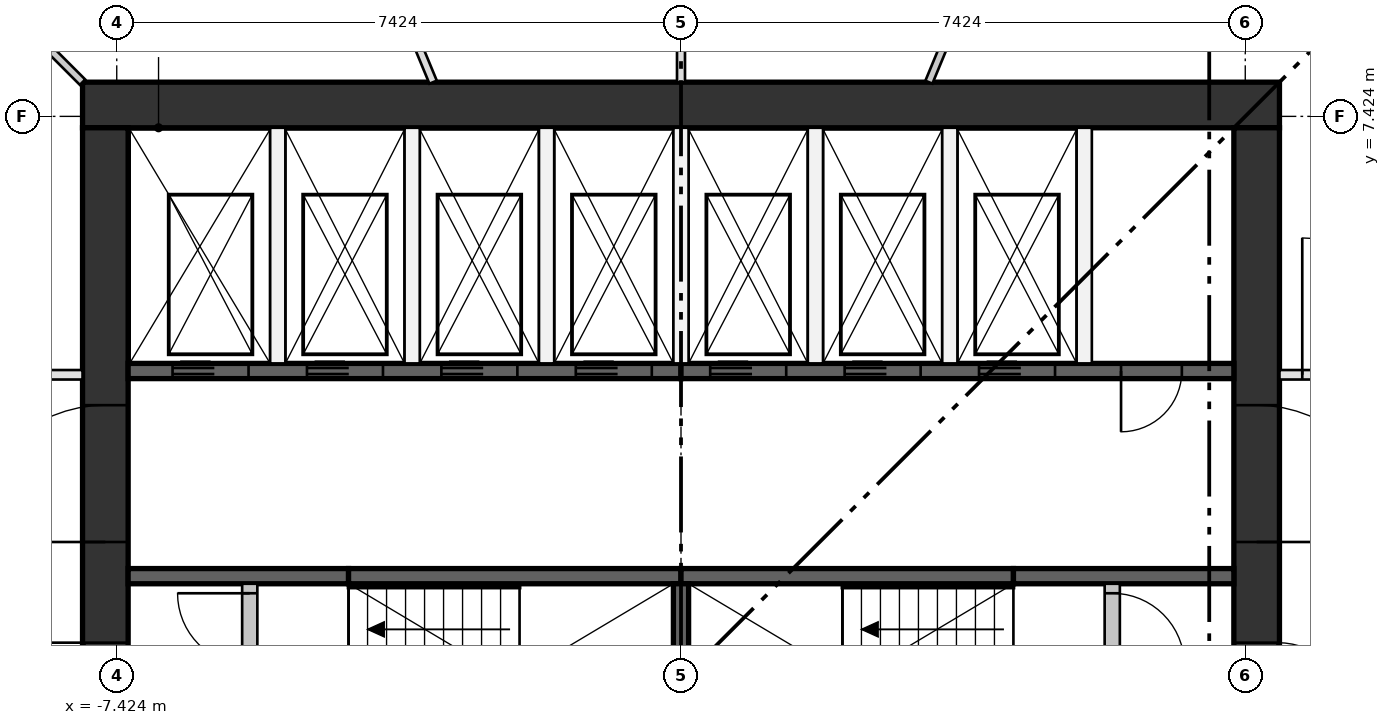
"""IFC4 building model, lengths in metres.
Left out: names, types, materials, properties, quantities, classifications, styles, units other than length and angle.
Written with IfcOpenShell. Run it as: python <this file> out.ifc"""

import sys

from ifc_helpers import new_model, si_unit, direction, frame, frame_2d, origin, place, context, subcontext, project, spatial, rectangle, extrude, element, fill, save


model = new_model("IFC4")
c1 = context("Model", 3, precision=1e-05, world=origin(), true_north=direction((0.0, 1.0)))
c2 = subcontext(c1, "Body", "Model", "MODEL_VIEW")
j1 = project(units=[si_unit("LENGTHUNIT", "METRE"), si_unit("PLANEANGLEUNIT", "RADIAN")], contexts=[c1])
p1 = place(None, origin())
s1 = spatial("IfcSite", under=j1, at=p1, CompositionType="ELEMENT")
p2 = place(p1, origin())
s2 = spatial("IfcBuilding", under=s1, at=p2, CompositionType="ELEMENT")
p3 = place(p2, frame((0.0, 0.0, 147.75)))
s3 = spatial("IfcBuildingStorey", under=s2, at=p3, CompositionType="ELEMENT", Elevation=147.75)
p4 = place(p3, frame((-7.874, 7.574, 0.0), z_axis=(0.0, 0.0, 1.0), x_axis=(1.0, 0.0, 0.0)))
e1 = element("IfcWall", 1, at=p4, inside=s3, PredefinedType="SHEAR", context=c2, shape_type="SweptSolid", body=[
    extrude(rectangle(XDim=15.748, YDim=0.6, at=frame_2d((7.874, 0.0))), origin(), (0.0, 0.0, 1.0), 3.35),
])
p5 = place(p3, frame((-7.574, -7.274, 0.0), z_axis=(0.0, 0.0, 1.0), x_axis=(0.0, 1.0, 0.0)))
e2 = element("IfcWall", 2, at=p5, inside=s3, PredefinedType="SHEAR", context=c2, shape_type="SweptSolid", body=[
    extrude(rectangle(XDim=14.548, YDim=0.6, at=frame_2d((7.274, 0.0))), origin(), (0.0, 0.0, 1.0), 3.35),
])
p6 = place(p5, frame((6.774, 0.0, 0.0)))
e3 = element("IfcOpeningElement", 3, at=p6, cuts=e2, PredefinedType="OPENING", context=c2, shape_type="SweptSolid", body=[
    extrude(rectangle(XDim=1.0, YDim=2.1, at=frame_2d((0.5, 1.05))), frame((0.0, 0.31, 0.0), z_axis=(0.0, -1.0, 0.0), x_axis=(1.0, 0.0, 0.0)), (0.0, 0.0, 1.0), 0.62),
])
p7 = place(p5, frame((3.649, 0.0, 0.0)))
e4 = element("IfcOpeningElement", 4, at=p7, cuts=e2, PredefinedType="OPENING", context=c2, shape_type="SweptSolid", body=[
    extrude(rectangle(XDim=1.8, YDim=2.1, at=frame_2d((0.9, 1.05))), frame((0.0, 0.31, 0.0), z_axis=(0.0, -1.0, 0.0), x_axis=(1.0, 0.0, 0.0)), (0.0, 0.0, 1.0), 0.62),
])
p8 = place(p5, frame((9.098, 0.0, 0.0)))
e5 = element("IfcOpeningElement", 5, at=p8, cuts=e2, PredefinedType="OPENING", context=c2, shape_type="SweptSolid", body=[
    extrude(rectangle(XDim=1.8, YDim=2.1, at=frame_2d((0.9, 1.05))), frame((0.0, 0.31, 0.0), z_axis=(0.0, -1.0, 0.0), x_axis=(1.0, 0.0, 0.0)), (0.0, 0.0, 1.0), 0.62),
])
p9 = place(p3, frame((7.574, -7.274, 0.0), z_axis=(0.0, 0.0, 1.0), x_axis=(0.0, 1.0, 0.0)))
e6 = element("IfcWall", 6, at=p9, inside=s3, PredefinedType="SHEAR", context=c2, shape_type="SweptSolid", body=[
    extrude(rectangle(XDim=14.548, YDim=0.6, at=frame_2d((7.274, 0.0))), origin(), (0.0, 0.0, 1.0), 3.35),
])
p10 = place(p9, frame((6.774, 0.0, 0.0)))
e7 = element("IfcOpeningElement", 7, at=p10, cuts=e6, PredefinedType="OPENING", context=c2, shape_type="SweptSolid", body=[
    extrude(rectangle(XDim=1.0, YDim=2.1, at=frame_2d((0.5, 1.05))), frame((0.0, 0.31, 0.0), z_axis=(0.0, -1.0, 0.0), x_axis=(1.0, 0.0, 0.0)), (0.0, 0.0, 1.0), 0.62),
])
p11 = place(p9, frame((3.649, 0.0, 0.0)))
e8 = element("IfcOpeningElement", 8, at=p11, cuts=e6, PredefinedType="OPENING", context=c2, shape_type="SweptSolid", body=[
    extrude(rectangle(XDim=1.8, YDim=2.1, at=frame_2d((0.9, 1.05))), frame((0.0, 0.31, 0.0), z_axis=(0.0, -1.0, 0.0), x_axis=(1.0, 0.0, 0.0)), (0.0, 0.0, 1.0), 0.62),
])
p12 = place(p9, frame((9.098, 0.0, 0.0)))
e9 = element("IfcOpeningElement", 9, at=p12, cuts=e6, PredefinedType="OPENING", context=c2, shape_type="SweptSolid", body=[
    extrude(rectangle(XDim=1.8, YDim=2.1, at=frame_2d((0.9, 1.05))), frame((0.0, 0.31, 0.0), z_axis=(0.0, -1.0, 0.0), x_axis=(1.0, 0.0, 0.0)), (0.0, 0.0, 1.0), 0.62),
])
p13 = place(p3, frame((-7.274, 4.074, 0.0), z_axis=(0.0, 0.0, 1.0), x_axis=(1.0, 0.0, 0.0)))
e10 = element("IfcWall", 10, at=p13, inside=s3, PredefinedType="SHEAR", context=c2, shape_type="SweptSolid", body=[
    extrude(rectangle(XDim=7.274, YDim=0.2, at=frame_2d((3.637, 0.0))), origin(), (0.0, 0.0, 1.0), 3.0),
])
p14 = place(p13, frame((0.584, 0.0, 0.0)))
e11 = element("IfcOpeningElement", 11, at=p14, cuts=e10, PredefinedType="OPENING", context=c2, shape_type="SweptSolid", body=[
    extrude(rectangle(XDim=1.0, YDim=2.1, at=frame_2d((0.5, 1.05))), frame((0.0, 0.11, 0.0), z_axis=(0.0, -1.0, 0.0), x_axis=(1.0, 0.0, 0.0)), (0.0, 0.0, 1.0), 0.22),
])
p15 = place(p13, frame((2.353, 0.0, 0.0)))
e12 = element("IfcOpeningElement", 12, at=p15, cuts=e10, PredefinedType="OPENING", context=c2, shape_type="SweptSolid", body=[
    extrude(rectangle(XDim=1.0, YDim=2.1, at=frame_2d((0.5, 1.05))), frame((0.0, 0.11, 0.0), z_axis=(0.0, -1.0, 0.0), x_axis=(1.0, 0.0, 0.0)), (0.0, 0.0, 1.0), 0.22),
])
p16 = place(p13, frame((4.121, 0.0, 0.0)))
e13 = element("IfcOpeningElement", 13, at=p16, cuts=e10, PredefinedType="OPENING", context=c2, shape_type="SweptSolid", body=[
    extrude(rectangle(XDim=1.0, YDim=2.1, at=frame_2d((0.5, 1.05))), frame((0.0, 0.11, 0.0), z_axis=(0.0, -1.0, 0.0), x_axis=(1.0, 0.0, 0.0)), (0.0, 0.0, 1.0), 0.22),
])
p17 = place(p13, frame((5.89, 0.0, 0.0)))
e14 = element("IfcOpeningElement", 14, at=p17, cuts=e10, PredefinedType="OPENING", context=c2, shape_type="SweptSolid", body=[
    extrude(rectangle(XDim=1.0, YDim=2.1, at=frame_2d((0.5, 1.05))), frame((0.0, 0.11, 0.0), z_axis=(0.0, -1.0, 0.0), x_axis=(1.0, 0.0, 0.0)), (0.0, 0.0, 1.0), 0.22),
])
p18 = place(p3, frame((0.0, 4.074, 0.0), z_axis=(0.0, 0.0, 1.0), x_axis=(1.0, 0.0, 0.0)))
e15 = element("IfcWall", 15, at=p18, inside=s3, PredefinedType="SHEAR", context=c2, shape_type="SweptSolid", body=[
    extrude(rectangle(XDim=7.274, YDim=0.2, at=frame_2d((3.637, 0.0))), origin(), (0.0, 0.0, 1.0), 3.0),
])
p19 = place(p18, frame((0.384, 0.0, 0.0)))
e16 = element("IfcOpeningElement", 16, at=p19, cuts=e15, PredefinedType="OPENING", context=c2, shape_type="SweptSolid", body=[
    extrude(rectangle(XDim=1.0, YDim=2.1, at=frame_2d((0.5, 1.05))), frame((0.0, 0.11, 0.0), z_axis=(0.0, -1.0, 0.0), x_axis=(1.0, 0.0, 0.0)), (0.0, 0.0, 1.0), 0.22),
])
p20 = place(p18, frame((2.153, 0.0, 0.0)))
e17 = element("IfcOpeningElement", 17, at=p20, cuts=e15, PredefinedType="OPENING", context=c2, shape_type="SweptSolid", body=[
    extrude(rectangle(XDim=1.0, YDim=2.1, at=frame_2d((0.5, 1.05))), frame((0.0, 0.11, 0.0), z_axis=(0.0, -1.0, 0.0), x_axis=(1.0, 0.0, 0.0)), (0.0, 0.0, 1.0), 0.22),
])
p21 = place(p18, frame((3.921, 0.0, 0.0)))
e18 = element("IfcOpeningElement", 18, at=p21, cuts=e15, PredefinedType="OPENING", context=c2, shape_type="SweptSolid", body=[
    extrude(rectangle(XDim=1.0, YDim=2.1, at=frame_2d((0.5, 1.05))), frame((0.0, 0.11, 0.0), z_axis=(0.0, -1.0, 0.0), x_axis=(1.0, 0.0, 0.0)), (0.0, 0.0, 1.0), 0.22),
])
p22 = place(p18, frame((5.79, 0.0, 0.0)))
e19 = element("IfcOpeningElement", 19, at=p22, cuts=e15, PredefinedType="OPENING", context=c2, shape_type="SweptSolid", body=[
    extrude(rectangle(XDim=0.8, YDim=2.1, at=frame_2d((0.4, 1.05))), frame((0.0, 0.11, 0.0), z_axis=(0.0, -1.0, 0.0), x_axis=(1.0, 0.0, 0.0)), (0.0, 0.0, 1.0), 0.22),
])
p23 = place(p3, frame((-7.274, 1.375, 0.0), z_axis=(0.0, 0.0, 1.0), x_axis=(1.0, 0.0, 0.0)))
e20 = element("IfcWall", 20, at=p23, inside=s3, PredefinedType="SHEAR", context=c2, shape_type="SweptSolid", body=[
    extrude(rectangle(XDim=2.9, YDim=0.2, at=frame_2d((1.45, 0.0))), origin(), (0.0, 0.0, 1.0), 3.0),
])
for number, where, z_axis, x_axis in (
    (21, (-4.374, 1.375, 0.0), (0.0, 0.0, 1.0), (1.0, 0.0, 0.0)),
    (22, (0.0, 1.375, 0.0), (0.0, 0.0, 1.0), (1.0, 0.0, 0.0)),
):
    element("IfcWall", number, at=place(p3, frame(where, z_axis=z_axis, x_axis=x_axis)), inside=s3, PredefinedType="SHEAR", context=c2, shape_type="SweptSolid", body=[
        extrude(rectangle(XDim=4.374, YDim=0.2, at=frame_2d((2.187, 0.0))), origin(), (0.0, 0.0, 1.0), 3.0),
    ])
p24 = place(p3, frame((4.374, 1.375, 0.0), z_axis=(0.0, 0.0, 1.0), x_axis=(1.0, 0.0, 0.0)))
e23 = element("IfcWall", 23, at=p24, inside=s3, PredefinedType="SHEAR", context=c2, shape_type="SweptSolid", body=[
    extrude(rectangle(XDim=2.9, YDim=0.2, at=frame_2d((1.45, 0.0))), origin(), (0.0, 0.0, 1.0), 3.0),
])
p25 = place(p3, frame((0.0, -1.275, 0.0), z_axis=(0.0, 0.0, 1.0), x_axis=(0.0, 1.0, 0.0)))
e24 = element("IfcWall", 24, at=p25, inside=s3, PredefinedType="SHEAR", context=c2, shape_type="SweptSolid", body=[
    extrude(rectangle(XDim=2.55, YDim=0.2, at=frame_2d((1.275, 0.0))), origin(), (0.0, 0.0, 1.0), 3.0),
])
for number, where, z_axis, x_axis in (
    (25, (-5.305, 4.174, 0.0), (0.0, 0.0, 1.0), (0.0, 1.0, 0.0)),
    (26, (-3.537, 4.174, 0.0), (0.0, 0.0, 1.0), (0.0, 1.0, 0.0)),
    (27, (-1.769, 4.174, 0.0), (0.0, 0.0, 1.0), (0.0, 1.0, 0.0)),
    (28, (0.0, 4.174, 0.0), (0.0, 0.0, 1.0), (0.0, 1.0, 0.0)),
    (29, (1.769, 4.174, 0.0), (0.0, 0.0, 1.0), (0.0, 1.0, 0.0)),
    (30, (3.537, 4.174, 0.0), (0.0, 0.0, 1.0), (0.0, 1.0, 0.0)),
    (31, (5.305, 4.174, 0.0), (0.0, 0.0, 1.0), (0.0, 1.0, 0.0)),
):
    element("IfcWall", number, at=place(p3, frame(where, z_axis=z_axis, x_axis=x_axis)), inside=s3, PredefinedType="PARTITIONING", context=c2, shape_type="SweptSolid", body=[
        extrude(rectangle(XDim=3.1, YDim=0.2, at=frame_2d((1.55, 0.0))), origin(), (0.0, 0.0, 1.0), 3.0),
    ])
p26 = place(p3, frame((-5.674, -1.275, 0.0), z_axis=(0.0, 0.0, 1.0), x_axis=(0.0, 1.0, 0.0)))
e32 = element("IfcWall", 32, at=p26, inside=s3, PredefinedType="PARTITIONING", context=c2, shape_type="SweptSolid", body=[
    extrude(rectangle(XDim=2.55, YDim=0.2, at=frame_2d((1.275, 0.0))), origin(), (0.0, 0.0, 1.0), 3.0),
])
p27 = place(p26, frame((0.125, 0.0, 0.0)))
e33 = element("IfcOpeningElement", 33, at=p27, cuts=e32, PredefinedType="OPENING", context=c2, shape_type="SweptSolid", body=[
    extrude(rectangle(XDim=0.95, YDim=2.1, at=frame_2d((0.475, 1.05))), frame((0.0, 0.11, 0.0), z_axis=(0.0, -1.0, 0.0), x_axis=(1.0, 0.0, 0.0)), (0.0, 0.0, 1.0), 0.22),
])
p28 = place(p26, frame((1.475, 0.0, 0.0)))
e34 = element("IfcOpeningElement", 34, at=p28, cuts=e32, PredefinedType="OPENING", context=c2, shape_type="SweptSolid", body=[
    extrude(rectangle(XDim=0.95, YDim=2.1, at=frame_2d((0.475, 1.05))), frame((0.0, 0.11, 0.0), z_axis=(0.0, -1.0, 0.0), x_axis=(1.0, 0.0, 0.0)), (0.0, 0.0, 1.0), 0.22),
])
p29 = place(p3, frame((5.674, -1.275, 0.0), z_axis=(0.0, 0.0, 1.0), x_axis=(0.0, 1.0, 0.0)))
e35 = element("IfcWall", 35, at=p29, inside=s3, PredefinedType="PARTITIONING", context=c2, shape_type="SweptSolid", body=[
    extrude(rectangle(XDim=2.55, YDim=0.2, at=frame_2d((1.275, 0.0))), origin(), (0.0, 0.0, 1.0), 3.0),
])
p30 = place(p29, frame((0.125, 0.0, 0.0)))
e36 = element("IfcOpeningElement", 36, at=p30, cuts=e35, PredefinedType="OPENING", context=c2, shape_type="SweptSolid", body=[
    extrude(rectangle(XDim=0.95, YDim=2.1, at=frame_2d((0.475, 1.05))), frame((0.0, 0.11, 0.0), z_axis=(0.0, -1.0, 0.0), x_axis=(1.0, 0.0, 0.0)), (0.0, 0.0, 1.0), 0.22),
])
p31 = place(p29, frame((1.475, 0.0, 0.0)))
e37 = element("IfcOpeningElement", 37, at=p31, cuts=e35, PredefinedType="OPENING", context=c2, shape_type="SweptSolid", body=[
    extrude(rectangle(XDim=0.95, YDim=2.1, at=frame_2d((0.475, 1.05))), frame((0.0, 0.11, 0.0), z_axis=(0.0, -1.0, 0.0), x_axis=(1.0, 0.0, 0.0)), (0.0, 0.0, 1.0), 0.22),
])
p32 = place(p3, frame((7.874, 4.024, 0.0), z_axis=(0.0, 0.0, 1.0), x_axis=(1.0, 0.0, 0.0)))
e38 = element("IfcWall", 38, at=p32, inside=s3, PredefinedType="PARTITIONING", context=c2, shape_type="SweptSolid", body=[
    extrude(rectangle(XDim=3.529, YDim=0.125, at=frame_2d((1.764, 0.0))), origin(), (0.0, 0.0, 1.0), 3.0),
])
p33 = place(p32, frame((0.3, 0.0, 0.0)))
e39 = element("IfcOpeningElement", 39, at=p33, cuts=e38, PredefinedType="OPENING", context=c2, shape_type="SweptSolid", body=[
    extrude(rectangle(XDim=1.8, YDim=2.1, at=frame_2d((0.9, 1.05))), frame((0.0, 0.073, 0.0), z_axis=(0.0, -1.0, 0.0), x_axis=(1.0, 0.0, 0.0)), (0.0, 0.0, 1.0), 0.145),
])
p34 = place(p3, frame((-11.508, 4.024, 0.0), z_axis=(0.0, 0.0, 1.0), x_axis=(1.0, 0.0, 0.0)))
e40 = element("IfcWall", 40, at=p34, inside=s3, PredefinedType="PARTITIONING", context=c2, shape_type="SweptSolid", body=[
    extrude(rectangle(XDim=3.634, YDim=0.125, at=frame_2d((1.817, 0.0))), origin(), (0.0, 0.0, 1.0), 3.0),
])
p35 = place(p34, frame((1.3, 0.0, 0.0)))
e41 = element("IfcOpeningElement", 41, at=p35, cuts=e40, PredefinedType="OPENING", context=c2, shape_type="SweptSolid", body=[
    extrude(rectangle(XDim=1.0, YDim=2.1, at=frame_2d((0.5, 1.05))), frame((0.0, 0.073, 0.0), z_axis=(0.0, -1.0, 0.0), x_axis=(1.0, 0.0, 0.0)), (0.0, 0.0, 1.0), 0.145),
])
p36 = place(p3, frame((3.261, 7.874, 0.0), z_axis=(0.0, 0.0, 1.0), x_axis=(0.382694772383, 0.92387483524, 0.0)))
e42 = element("IfcWall", 42, at=p36, inside=s3, PredefinedType="PARTITIONING", context=c2, shape_type="SweptSolid", body=[
    extrude(rectangle(XDim=6.077, YDim=0.1, at=frame_2d((3.039, 0.0))), origin(), (0.0, 0.0, 1.0), 3.0),
])
p37 = place(p36, frame((2.5, 0.0, 0.0)))
e43 = element("IfcOpeningElement", 43, at=p37, cuts=e42, PredefinedType="OPENING", context=c2, shape_type="SweptSolid", body=[
    extrude(rectangle(XDim=1.0, YDim=2.1, at=frame_2d((0.5, 1.05))), frame((0.0, 0.06, 0.0), z_axis=(0.0, -1.0, 0.0), x_axis=(1.0, 0.0, 0.0)), (0.0, 0.0, 1.0), 0.12),
])
p38 = place(p3, frame((0.0, 7.874, 0.0), z_axis=(0.0, 0.0, 1.0), x_axis=(0.0, 1.0, 0.0)))
e44 = element("IfcWall", 44, at=p38, inside=s3, PredefinedType="PARTITIONING", context=c2, shape_type="SweptSolid", body=[
    extrude(rectangle(XDim=6.726, YDim=0.105, at=frame_2d((3.363, 0.0))), origin(), (0.0, 0.0, 1.0), 3.0),
])
p39 = place(p38, frame((2.9, 0.0, 0.0)))
e45 = element("IfcOpeningElement", 45, at=p39, cuts=e44, PredefinedType="OPENING", context=c2, shape_type="SweptSolid", body=[
    extrude(rectangle(XDim=1.0, YDim=2.1, at=frame_2d((0.5, 1.05))), frame((0.0, 0.062, 0.0), z_axis=(0.0, -1.0, 0.0), x_axis=(1.0, 0.0, 0.0)), (0.0, 0.0, 1.0), 0.125),
])
p40 = place(p3, frame((-3.261, 7.874, 0.0), z_axis=(0.0, 0.0, 1.0), x_axis=(-0.382694772383, 0.92387483524, 0.0)))
e46 = element("IfcWall", 46, at=p40, inside=s3, PredefinedType="PARTITIONING", context=c2, shape_type="SweptSolid", body=[
    extrude(rectangle(XDim=6.077, YDim=0.105, at=frame_2d((3.039, 0.0))), origin(), (0.0, 0.0, 1.0), 3.0),
])
p41 = place(p3, frame((-12.565, 12.565, 0.0), z_axis=(0.0, 0.0, 1.0), x_axis=(0.707106781187, -0.707106781187, 0.0)))
e47 = element("IfcWall", 47, at=p41, inside=s3, PredefinedType="PARTITIONING", context=c2, shape_type="SweptSolid", body=[
    extrude(rectangle(XDim=6.634, YDim=0.1, at=frame_2d((3.317, 0.0))), origin(), (0.0, 0.0, 1.0), 3.0),
])
p42 = place(p41, frame((3.0, 0.0, 0.0)))
e48 = element("IfcOpeningElement", 48, at=p42, cuts=e47, PredefinedType="OPENING", context=c2, shape_type="SweptSolid", body=[
    extrude(rectangle(XDim=1.0, YDim=2.1, at=frame_2d((0.5, 1.05))), frame((0.0, 0.06, 0.0), z_axis=(0.0, -1.0, 0.0), x_axis=(1.0, 0.0, 0.0)), (0.0, 0.0, 1.0), 0.12),
])
p43 = place(p14, frame((1.0, 0.0, 0.0), z_axis=(0.0, 0.0, 1.0), x_axis=(-1.0, 0.0, 0.0)))
e49 = element("IfcDoor", 49, at=p43, inside=s3, OperationType="DOUBLE_DOOR_SLIDING", PredefinedType="DOOR", context=c2, shape_type="SweptSolid", body=[
    extrude(rectangle(XDim=1.0, YDim=2.1, at=frame_2d((0.5, 1.05))), frame((0.0, 0.025, 0.0), z_axis=(0.0, -1.0, 0.0), x_axis=(1.0, 0.0, 0.0)), (0.0, 0.0, 1.0), 0.05),
])
fill(e11, e49)
p44 = place(p15, frame((1.0, 0.0, 0.0), z_axis=(0.0, 0.0, 1.0), x_axis=(-1.0, 0.0, 0.0)))
e50 = element("IfcDoor", 50, at=p44, inside=s3, OperationType="DOUBLE_DOOR_SLIDING", PredefinedType="DOOR", context=c2, shape_type="SweptSolid", body=[
    extrude(rectangle(XDim=1.0, YDim=2.1, at=frame_2d((0.5, 1.05))), frame((0.0, 0.025, 0.0), z_axis=(0.0, -1.0, 0.0), x_axis=(1.0, 0.0, 0.0)), (0.0, 0.0, 1.0), 0.05),
])
fill(e12, e50)
p45 = place(p16, frame((1.0, 0.0, 0.0), z_axis=(0.0, 0.0, 1.0), x_axis=(-1.0, 0.0, 0.0)))
e51 = element("IfcDoor", 51, at=p45, inside=s3, OperationType="DOUBLE_DOOR_SLIDING", PredefinedType="DOOR", context=c2, shape_type="SweptSolid", body=[
    extrude(rectangle(XDim=1.0, YDim=2.1, at=frame_2d((0.5, 1.05))), frame((0.0, 0.025, 0.0), z_axis=(0.0, -1.0, 0.0), x_axis=(1.0, 0.0, 0.0)), (0.0, 0.0, 1.0), 0.05),
])
fill(e13, e51)
p46 = place(p17, frame((1.0, 0.0, 0.0), z_axis=(0.0, 0.0, 1.0), x_axis=(-1.0, 0.0, 0.0)))
e52 = element("IfcDoor", 52, at=p46, inside=s3, OperationType="DOUBLE_DOOR_SLIDING", PredefinedType="DOOR", context=c2, shape_type="SweptSolid", body=[
    extrude(rectangle(XDim=1.0, YDim=2.1, at=frame_2d((0.5, 1.05))), frame((0.0, 0.025, 0.0), z_axis=(0.0, -1.0, 0.0), x_axis=(1.0, 0.0, 0.0)), (0.0, 0.0, 1.0), 0.05),
])
fill(e14, e52)
p47 = place(p19, frame((1.0, 0.0, 0.0), z_axis=(0.0, 0.0, 1.0), x_axis=(-1.0, 0.0, 0.0)))
e53 = element("IfcDoor", 53, at=p47, inside=s3, OperationType="DOUBLE_DOOR_SLIDING", PredefinedType="DOOR", context=c2, shape_type="SweptSolid", body=[
    extrude(rectangle(XDim=1.0, YDim=2.1, at=frame_2d((0.5, 1.05))), frame((0.0, 0.025, 0.0), z_axis=(0.0, -1.0, 0.0), x_axis=(1.0, 0.0, 0.0)), (0.0, 0.0, 1.0), 0.05),
])
fill(e16, e53)
p48 = place(p20, frame((1.0, 0.0, 0.0), z_axis=(0.0, 0.0, 1.0), x_axis=(-1.0, 0.0, 0.0)))
e54 = element("IfcDoor", 54, at=p48, inside=s3, OperationType="DOUBLE_DOOR_SLIDING", PredefinedType="DOOR", context=c2, shape_type="SweptSolid", body=[
    extrude(rectangle(XDim=1.0, YDim=2.1, at=frame_2d((0.5, 1.05))), frame((0.0, 0.025, 0.0), z_axis=(0.0, -1.0, 0.0), x_axis=(1.0, 0.0, 0.0)), (0.0, 0.0, 1.0), 0.05),
])
fill(e17, e54)
p49 = place(p21, frame((1.0, 0.0, 0.0), z_axis=(0.0, 0.0, 1.0), x_axis=(-1.0, 0.0, 0.0)))
e55 = element("IfcDoor", 55, at=p49, inside=s3, OperationType="DOUBLE_DOOR_SLIDING", PredefinedType="DOOR", context=c2, shape_type="SweptSolid", body=[
    extrude(rectangle(XDim=1.0, YDim=2.1, at=frame_2d((0.5, 1.05))), frame((0.0, 0.025, 0.0), z_axis=(0.0, -1.0, 0.0), x_axis=(1.0, 0.0, 0.0)), (0.0, 0.0, 1.0), 0.05),
])
fill(e18, e55)
p50 = place(p28, origin())
e56 = element("IfcDoor", 56, at=p50, inside=s3, OperationType="SINGLE_SWING_RIGHT", PredefinedType="DOOR", context=c2, shape_type="SweptSolid", body=[
    extrude(rectangle(XDim=0.95, YDim=2.1, at=frame_2d((0.475, 1.05))), frame((0.0, 0.025, 0.0), z_axis=(0.0, -1.0, 0.0), x_axis=(1.0, 0.0, 0.0)), (0.0, 0.0, 1.0), 0.05),
])
fill(e34, e56)
p51 = place(p31, frame((0.95, 0.0, 0.0), z_axis=(0.0, 0.0, 1.0), x_axis=(-1.0, 0.0, 0.0)))
e57 = element("IfcDoor", 57, at=p51, inside=s3, OperationType="SINGLE_SWING_LEFT", PredefinedType="DOOR", context=c2, shape_type="SweptSolid", body=[
    extrude(rectangle(XDim=0.95, YDim=2.1, at=frame_2d((0.475, 1.05))), frame((0.0, 0.025, 0.0), z_axis=(0.0, -1.0, 0.0), x_axis=(1.0, 0.0, 0.0)), (0.0, 0.0, 1.0), 0.05),
])
fill(e37, e57)
p52 = place(p22, frame((0.8, 0.0, 0.0), z_axis=(0.0, 0.0, 1.0), x_axis=(-1.0, 0.0, 0.0)))
e58 = element("IfcDoor", 58, at=p52, inside=s3, OperationType="SINGLE_SWING_LEFT", PredefinedType="DOOR", context=c2, shape_type="SweptSolid", body=[
    extrude(rectangle(XDim=0.8, YDim=2.1, at=frame_2d((0.4, 1.05))), frame((0.0, 0.025, 0.0), z_axis=(0.0, -1.0, 0.0), x_axis=(1.0, 0.0, 0.0)), (0.0, 0.0, 1.0), 0.05),
])
fill(e19, e58)
p53 = place(p6, origin())
e59 = element("IfcDoor", 59, at=p53, inside=s3, OperationType="SINGLE_SWING_RIGHT", PredefinedType="DOOR", context=c2, shape_type="SweptSolid", body=[
    extrude(rectangle(XDim=1.0, YDim=2.1, at=frame_2d((0.5, 1.05))), frame((0.0, 0.3, 0.0), z_axis=(0.0, -1.0, 0.0), x_axis=(1.0, 0.0, 0.0)), (0.0, 0.0, 1.0), 0.05),
])
fill(e3, e59)
p54 = place(p8, origin())
e60 = element("IfcDoor", 60, at=p54, inside=s3, OperationType="DOUBLE_DOOR_SINGLE_SWING", PredefinedType="DOOR", context=c2, shape_type="SweptSolid", body=[
    extrude(rectangle(XDim=1.8, YDim=2.1, at=frame_2d((0.9, 1.05))), frame((0.0, 0.025, 0.0), z_axis=(0.0, -1.0, 0.0), x_axis=(1.0, 0.0, 0.0)), (0.0, 0.0, 1.0), 0.05),
])
fill(e5, e60)
p55 = place(p10, frame((1.0, 0.0, 0.0), z_axis=(0.0, 0.0, 1.0), x_axis=(-1.0, 0.0, 0.0)))
e61 = element("IfcDoor", 61, at=p55, inside=s3, OperationType="SINGLE_SWING_LEFT", PredefinedType="DOOR", context=c2, shape_type="SweptSolid", body=[
    extrude(rectangle(XDim=1.0, YDim=2.1, at=frame_2d((0.5, 1.05))), frame((0.0, 0.3, 0.0), z_axis=(0.0, -1.0, 0.0), x_axis=(1.0, 0.0, 0.0)), (0.0, 0.0, 1.0), 0.05),
])
fill(e7, e61)
p56 = place(p12, frame((1.8, 0.0, 0.0), z_axis=(0.0, 0.0, 1.0), x_axis=(-1.0, 0.0, 0.0)))
e62 = element("IfcDoor", 62, at=p56, inside=s3, OperationType="DOUBLE_DOOR_SINGLE_SWING", PredefinedType="DOOR", context=c2, shape_type="SweptSolid", body=[
    extrude(rectangle(XDim=1.8, YDim=2.1, at=frame_2d((0.9, 1.05))), frame((0.0, 0.025, 0.0), z_axis=(0.0, -1.0, 0.0), x_axis=(1.0, 0.0, 0.0)), (0.0, 0.0, 1.0), 0.05),
])
fill(e9, e62)
p57 = place(p33, origin())
e63 = element("IfcDoor", 63, at=p57, inside=s3, OperationType="DOUBLE_DOOR_SINGLE_SWING", PredefinedType="DOOR", context=c2, shape_type="SweptSolid", body=[
    extrude(rectangle(XDim=1.8, YDim=2.1, at=frame_2d((0.9, 1.05))), frame((0.0, 0.025, 0.0), z_axis=(0.0, -1.0, 0.0), x_axis=(1.0, 0.0, 0.0)), (0.0, 0.0, 1.0), 0.05),
])
fill(e39, e63)
save(model, sys.argv[1])
